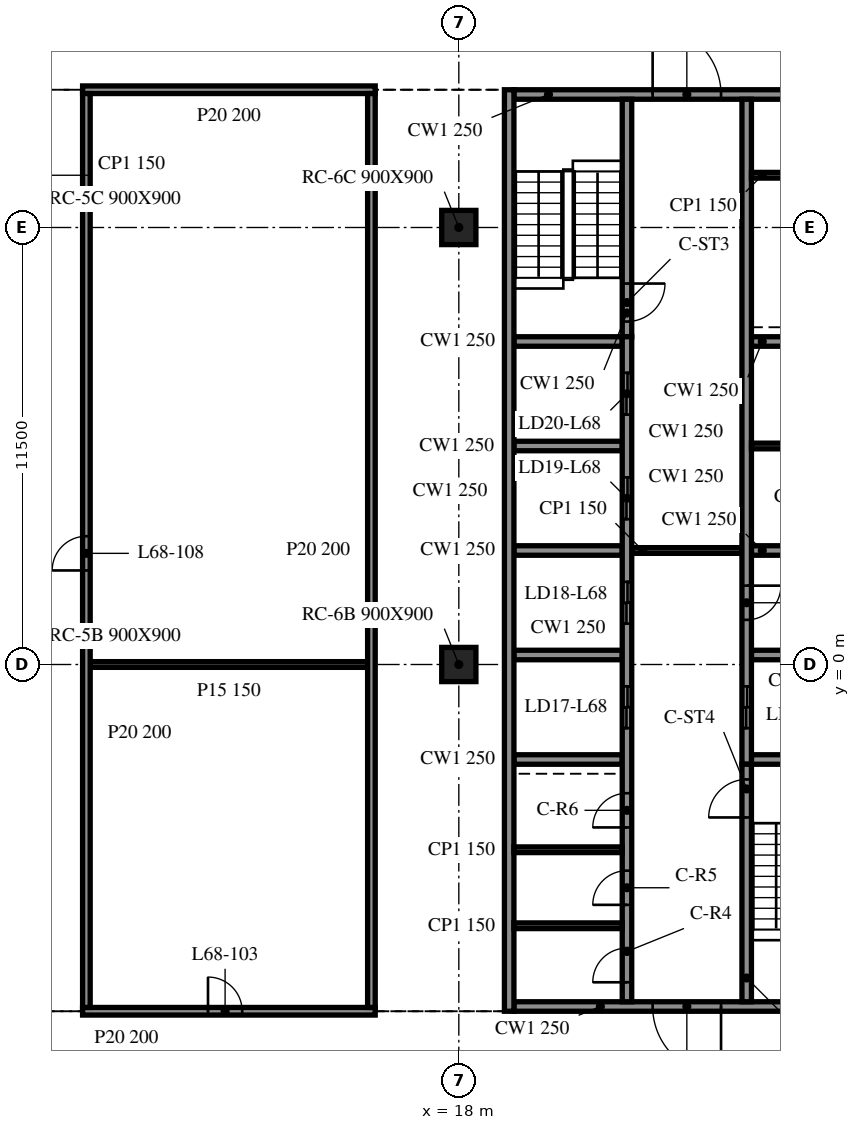
"""IFC4 building model, lengths in metres.
Left out: names, types, materials, properties, quantities, classifications, styles, units other than length and angle.
Written with IfcOpenShell. Run it as: python <this file> out.ifc"""

import sys

from ifc_helpers import new_model, si_unit, direction, frame, frame_2d, origin, origin_2d, place, context, subcontext, project, spatial, rectangle, extrude, element, fill, save


model = new_model("IFC4")
c1 = context("Model", 3, precision=1e-05, world=origin(), true_north=direction((0.0, 1.0)))
c2 = subcontext(c1, "Body", "Model", "MODEL_VIEW")
j1 = project(units=[si_unit("LENGTHUNIT", "METRE"), si_unit("PLANEANGLEUNIT", "RADIAN")], contexts=[c1])
p1 = place(None, origin())
s1 = spatial("IfcSite", under=j1, at=p1, CompositionType="ELEMENT")
p2 = place(p1, origin())
s2 = spatial("IfcBuilding", under=s1, at=p2, CompositionType="ELEMENT")
p3 = place(p2, frame((0.0, 0.0, 278.5)))
s3 = spatial("IfcBuildingStorey", under=s2, at=p3, CompositionType="ELEMENT", Elevation=278.5)
for number, where, z_axis, x_axis in (
    (1, (18.0, 0.0, -0.34), (0.0, 0.0, 1.0), (1.0, 0.0, 0.0)),
    (2, (18.0, 11.5, -0.34), (0.0, 0.0, 1.0), (1.0, 0.0, 0.0)),
):
    element("IfcColumn", number, at=place(p3, frame(where, z_axis=z_axis, x_axis=x_axis)), inside=s3, PredefinedType="COLUMN", context=c2, shape_type="SweptSolid", body=[
        extrude(rectangle(XDim=0.9, YDim=0.9, at=origin_2d()), origin(), (0.0, 0.0, 1.0), 3.8),
    ])
p4 = place(p3, frame((19.325, 15.125, 0.0), z_axis=(0.0, 0.0, 1.0), x_axis=(0.0, -1.0, 0.0)))
e3 = element("IfcWall", 3, at=p4, inside=s3, PredefinedType="SOLIDWALL", context=c2, shape_type="SweptSolid", body=[
    extrude(rectangle(XDim=24.25, YDim=0.25, at=frame_2d((12.125, 0.0))), origin(), (0.0, 0.0, 1.0), 3.46),
])
p5 = place(p3, frame((28.55, -9.0, 0.0), z_axis=(0.0, 0.0, 1.0), x_axis=(-1.0, 0.0, 0.0)))
e4 = element("IfcWall", 4, at=p5, inside=s3, PredefinedType="SOLIDWALL", context=c2, shape_type="SweptSolid", body=[
    extrude(rectangle(XDim=9.1, YDim=0.25, at=frame_2d((4.55, 0.0))), origin(), (0.0, 0.0, 1.0), 3.46),
])
p6 = place(p5, frame((3.65, 0.0, 0.0)))
e5 = element("IfcOpeningElement", 5, at=p6, cuts=e4, PredefinedType="OPENING", context=c2, shape_type="SweptSolid", body=[
    extrude(rectangle(XDim=1.8, YDim=2.1, at=frame_2d((0.9, 1.05))), frame((0.0, 0.135, 0.0), z_axis=(0.0, -1.0, 0.0), x_axis=(1.0, 0.0, 0.0)), (0.0, 0.0, 1.0), 0.27),
])
p7 = place(p3, frame((19.45, 15.0, 0.0), z_axis=(0.0, 0.0, 1.0), x_axis=(1.0, 0.0, 0.0)))
e6 = element("IfcWall", 6, at=p7, inside=s3, PredefinedType="SOLIDWALL", context=c2, shape_type="SweptSolid", body=[
    extrude(rectangle(XDim=9.1, YDim=0.25, at=frame_2d((4.55, 0.0))), origin(), (0.0, 0.0, 1.0), 3.46),
])
p8 = place(p7, frame((3.65, 0.0, 0.0)))
e7 = element("IfcOpeningElement", 7, at=p8, cuts=e6, PredefinedType="OPENING", context=c2, shape_type="SweptSolid", body=[
    extrude(rectangle(XDim=1.8, YDim=2.1, at=frame_2d((0.9, 1.05))), frame((0.0, 0.135, 0.0), z_axis=(0.0, -1.0, 0.0), x_axis=(1.0, 0.0, 0.0)), (0.0, 0.0, 1.0), 0.27),
])
p9 = place(p3, frame((22.425, -8.875, 0.0), z_axis=(0.0, 0.0, 1.0), x_axis=(0.0, 1.0, 0.0)))
e8 = element("IfcWall", 8, at=p9, inside=s3, PredefinedType="SOLIDWALL", context=c2, shape_type="SweptSolid", body=[
    extrude(rectangle(XDim=17.5, YDim=0.25, at=frame_2d((8.75, 0.0))), origin(), (0.0, 0.0, 1.0), 3.46),
])
p10 = place(p9, frame((7.2, 0.0, 0.0)))
e9 = element("IfcOpeningElement", 9, at=p10, cuts=e8, PredefinedType="OPENING", context=c2, shape_type="SweptSolid", body=[
    extrude(rectangle(XDim=1.1, YDim=2.1, at=frame_2d((0.55, 1.05))), frame((0.0, 0.135, 0.0), z_axis=(0.0, -1.0, 0.0), x_axis=(1.0, 0.0, 0.0)), (0.0, 0.0, 1.0), 0.27),
])
p11 = place(p9, frame((9.95, 0.0, 0.0)))
e10 = element("IfcOpeningElement", 10, at=p11, cuts=e8, PredefinedType="OPENING", context=c2, shape_type="SweptSolid", body=[
    extrude(rectangle(XDim=1.1, YDim=2.1, at=frame_2d((0.55, 1.05))), frame((0.0, 0.135, 0.0), z_axis=(0.0, -1.0, 0.0), x_axis=(1.0, 0.0, 0.0)), (0.0, 0.0, 1.0), 0.27),
])
p12 = place(p9, frame((12.7, 0.0, 0.0)))
e11 = element("IfcOpeningElement", 11, at=p12, cuts=e8, PredefinedType="OPENING", context=c2, shape_type="SweptSolid", body=[
    extrude(rectangle(XDim=1.1, YDim=2.1, at=frame_2d((0.55, 1.05))), frame((0.0, 0.135, 0.0), z_axis=(0.0, -1.0, 0.0), x_axis=(1.0, 0.0, 0.0)), (0.0, 0.0, 1.0), 0.27),
])
p13 = place(p9, frame((15.45, 0.0, 0.0)))
e12 = element("IfcOpeningElement", 12, at=p13, cuts=e8, PredefinedType="OPENING", context=c2, shape_type="SweptSolid", body=[
    extrude(rectangle(XDim=1.1, YDim=2.1, at=frame_2d((0.55, 1.05))), frame((0.0, 0.135, 0.0), z_axis=(0.0, -1.0, 0.0), x_axis=(1.0, 0.0, 0.0)), (0.0, 0.0, 1.0), 0.27),
])
p14 = place(p9, frame((0.512, 0.0, 0.0)))
e13 = element("IfcOpeningElement", 13, at=p14, cuts=e8, PredefinedType="OPENING", context=c2, shape_type="SweptSolid", body=[
    extrude(rectangle(XDim=0.9, YDim=2.1, at=frame_2d((0.45, 1.05))), frame((0.0, 0.135, 0.0), z_axis=(0.0, -1.0, 0.0), x_axis=(1.0, 0.0, 0.0)), (0.0, 0.0, 1.0), 0.27),
])
p15 = place(p9, frame((2.55, 0.0, 0.0)))
e14 = element("IfcOpeningElement", 14, at=p15, cuts=e8, PredefinedType="OPENING", context=c2, shape_type="SweptSolid", body=[
    extrude(rectangle(XDim=0.9, YDim=2.1, at=frame_2d((0.45, 1.05))), frame((0.0, 0.135, 0.0), z_axis=(0.0, -1.0, 0.0), x_axis=(1.0, 0.0, 0.0)), (0.0, 0.0, 1.0), 0.27),
])
p16 = place(p9, frame((4.587, 0.0, 0.0)))
e15 = element("IfcOpeningElement", 15, at=p16, cuts=e8, PredefinedType="OPENING", context=c2, shape_type="SweptSolid", body=[
    extrude(rectangle(XDim=0.9, YDim=2.1, at=frame_2d((0.45, 1.05))), frame((0.0, 0.135, 0.0), z_axis=(0.0, -1.0, 0.0), x_axis=(1.0, 0.0, 0.0)), (0.0, 0.0, 1.0), 0.27),
])
p17 = place(p3, frame((22.425, 14.875, 0.0), z_axis=(0.0, 0.0, 1.0), x_axis=(0.0, -1.0, 0.0)))
e16 = element("IfcWall", 16, at=p17, inside=s3, PredefinedType="SOLIDWALL", context=c2, shape_type="SweptSolid", body=[
    extrude(rectangle(XDim=6.25, YDim=0.25, at=frame_2d((3.125, 0.0))), origin(), (0.0, 0.0, 1.0), 3.46),
])
p18 = place(p17, frame((4.85, 0.0, 0.0)))
e17 = element("IfcOpeningElement", 17, at=p18, cuts=e16, PredefinedType="OPENING", context=c2, shape_type="SweptSolid", body=[
    extrude(rectangle(XDim=1.0, YDim=2.1, at=frame_2d((0.5, 1.05))), frame((0.0, 0.135, 0.0), z_axis=(0.0, -1.0, 0.0), x_axis=(1.0, 0.0, 0.0)), (0.0, 0.0, 1.0), 0.27),
])
p19 = place(p3, frame((25.575, -8.875, 0.0), z_axis=(0.0, 0.0, 1.0), x_axis=(0.0, 1.0, 0.0)))
e18 = element("IfcWall", 18, at=p19, inside=s3, PredefinedType="SOLIDWALL", context=c2, shape_type="SweptSolid", body=[
    extrude(rectangle(XDim=6.25, YDim=0.25, at=frame_2d((3.125, 0.0))), origin(), (0.0, 0.0, 1.0), 3.46),
])
p20 = place(p19, frame((4.85, 0.0, 0.0)))
e19 = element("IfcOpeningElement", 19, at=p20, cuts=e18, PredefinedType="OPENING", context=c2, shape_type="SweptSolid", body=[
    extrude(rectangle(XDim=1.0, YDim=2.1, at=frame_2d((0.5, 1.05))), frame((0.0, 0.135, 0.0), z_axis=(0.0, -1.0, 0.0), x_axis=(1.0, 0.0, 0.0)), (0.0, 0.0, 1.0), 0.27),
])
p21 = place(p3, frame((25.575, 14.875, 0.0), z_axis=(0.0, 0.0, 1.0), x_axis=(0.0, -1.0, 0.0)))
e20 = element("IfcWall", 20, at=p21, inside=s3, PredefinedType="SOLIDWALL", context=c2, shape_type="SweptSolid", body=[
    extrude(rectangle(XDim=17.5, YDim=0.25, at=frame_2d((8.75, 0.0))), origin(), (0.0, 0.0, 1.0), 3.46),
])
p22 = place(p21, frame((15.45, 0.0, 0.0)))
e21 = element("IfcOpeningElement", 21, at=p22, cuts=e20, PredefinedType="OPENING", context=c2, shape_type="SweptSolid", body=[
    extrude(rectangle(XDim=1.1, YDim=2.1, at=frame_2d((0.55, 1.05))), frame((0.0, 0.135, 0.0), z_axis=(0.0, -1.0, 0.0), x_axis=(1.0, 0.0, 0.0)), (0.0, 0.0, 1.0), 0.27),
])
p23 = place(p21, frame((12.8, 0.0, 0.0)))
e22 = element("IfcOpeningElement", 22, at=p23, cuts=e20, PredefinedType="OPENING", context=c2, shape_type="SweptSolid", body=[
    extrude(rectangle(XDim=0.9, YDim=2.1, at=frame_2d((0.45, 1.05))), frame((0.0, 0.135, 0.0), z_axis=(0.0, -1.0, 0.0), x_axis=(1.0, 0.0, 0.0)), (0.0, 0.0, 1.0), 0.27),
])
for number, where, z_axis, x_axis in (
    (23, (19.45, -2.5, 0.0), (0.0, 0.0, 1.0), (1.0, 0.0, 0.0)),
    (24, (19.45, 0.25, 0.0), (0.0, 0.0, 1.0), (1.0, 0.0, 0.0)),
    (25, (19.45, 3.0, 0.0), (0.0, 0.0, 1.0), (1.0, 0.0, 0.0)),
    (26, (19.45, 5.75, 0.0), (0.0, 0.0, 1.0), (1.0, 0.0, 0.0)),
    (27, (19.45, 8.5, 0.0), (0.0, 0.0, 1.0), (1.0, 0.0, 0.0)),
    (28, (25.7, -2.5, 0.0), (0.0, 0.0, 1.0), (1.0, 0.0, 0.0)),
    (29, (25.7, 0.25, 0.0), (0.0, 0.0, 1.0), (1.0, 0.0, 0.0)),
    (30, (25.7, 3.0, 0.0), (0.0, 0.0, 1.0), (1.0, 0.0, 0.0)),
    (31, (25.7, 8.5, 0.0), (0.0, 0.0, 1.0), (1.0, 0.0, 0.0)),
):
    element("IfcWall", number, at=place(p3, frame(where, z_axis=z_axis, x_axis=x_axis)), inside=s3, PredefinedType="SOLIDWALL", context=c2, shape_type="SweptSolid", body=[
        extrude(rectangle(XDim=2.85, YDim=0.25, at=frame_2d((1.425, 0.0))), origin(), (0.0, 0.0, 1.0), 3.46),
    ])
p24 = place(p3, frame((22.55, 3.0, 0.0), z_axis=(0.0, 0.0, 1.0), x_axis=(1.0, 0.0, 0.0)))
e32 = element("IfcWall", 32, at=p24, inside=s3, PredefinedType="PARTITIONING", context=c2, shape_type="SweptSolid", body=[
    extrude(rectangle(XDim=2.9, YDim=0.15, at=frame_2d((1.45, 0.0))), origin(), (0.0, 0.0, 1.0), 3.46),
])
for number, where, z_axis, x_axis in (
    (33, (25.7, 5.75, 0.0), (0.0, 0.0, 1.0), (1.0, 0.0, 0.0)),
    (34, (19.45, -6.875, 0.0), (0.0, 0.0, 1.0), (1.0, 0.0, 0.0)),
    (35, (19.45, -4.875, 0.0), (0.0, 0.0, 1.0), (1.0, 0.0, 0.0)),
    (36, (25.7, 12.875, 0.0), (0.0, 0.0, 1.0), (1.0, 0.0, 0.0)),
):
    element("IfcWall", number, at=place(p3, frame(where, z_axis=z_axis, x_axis=x_axis)), inside=s3, PredefinedType="PARTITIONING", context=c2, shape_type="SweptSolid", body=[
        extrude(rectangle(XDim=2.85, YDim=0.15, at=frame_2d((1.425, 0.0))), origin(), (0.0, 0.0, 1.0), 3.46),
    ])
p25 = place(p3, frame((8.1, -9.125, 0.0), z_axis=(0.0, 0.0, 1.0), x_axis=(1.0, 0.0, 0.0)))
e37 = element("IfcWall", 37, at=p25, inside=s3, PredefinedType="PARTITIONING", context=c2, shape_type="SweptSolid", body=[
    extrude(rectangle(XDim=7.7, YDim=0.2, at=frame_2d((3.85, 0.0))), origin(), (0.0, 0.0, 1.0), 3.46),
])
p26 = place(p25, frame((3.3, 0.0, 0.0)))
e38 = element("IfcOpeningElement", 38, at=p26, cuts=e37, PredefinedType="OPENING", context=c2, shape_type="SweptSolid", body=[
    extrude(rectangle(XDim=0.9, YDim=2.1, at=frame_2d((0.45, 1.05))), frame((0.0, 0.11, 0.0), z_axis=(0.0, -1.0, 0.0), x_axis=(1.0, 0.0, 0.0)), (0.0, 0.0, 1.0), 0.22),
])
p27 = place(p3, frame((8.3, 0.0, 0.0), z_axis=(0.0, 0.0, 1.0), x_axis=(1.0, 0.0, 0.0)))
e39 = element("IfcWall", 39, at=p27, inside=s3, PredefinedType="PARTITIONING", context=c2, shape_type="SweptSolid", body=[
    extrude(rectangle(XDim=7.3, YDim=0.15, at=frame_2d((3.65, 0.0))), origin(), (0.0, 0.0, 1.0), 3.46),
])
p28 = place(p3, frame((8.1, 15.125, 0.0), z_axis=(0.0, 0.0, 1.0), x_axis=(1.0, 0.0, 0.0)))
e40 = element("IfcWall", 40, at=p28, inside=s3, PredefinedType="PARTITIONING", context=c2, shape_type="SweptSolid", body=[
    extrude(rectangle(XDim=7.7, YDim=0.2, at=frame_2d((3.85, 0.0))), origin(), (0.0, 0.0, 1.0), 3.46),
])
p29 = place(p3, frame((8.2, -9.025, 0.0), z_axis=(0.0, 0.0, 1.0), x_axis=(0.0, 1.0, 0.0)))
e41 = element("IfcWall", 41, at=p29, inside=s3, PredefinedType="PARTITIONING", context=c2, shape_type="SweptSolid", body=[
    extrude(rectangle(XDim=24.05, YDim=0.2, at=frame_2d((12.025, 0.0))), origin(), (0.0, 0.0, 1.0), 3.46),
])
p30 = place(p29, frame((11.5, 0.0, 0.0)))
e42 = element("IfcOpeningElement", 42, at=p30, cuts=e41, PredefinedType="OPENING", context=c2, shape_type="SweptSolid", body=[
    extrude(rectangle(XDim=0.9, YDim=2.1, at=frame_2d((0.45, 1.05))), frame((0.0, 0.11, 0.0), z_axis=(0.0, -1.0, 0.0), x_axis=(1.0, 0.0, 0.0)), (0.0, 0.0, 1.0), 0.22),
])
p31 = place(p3, frame((15.7, -9.025, 0.0), z_axis=(0.0, 0.0, 1.0), x_axis=(0.0, 1.0, 0.0)))
e43 = element("IfcWall", 43, at=p31, inside=s3, PredefinedType="PARTITIONING", context=c2, shape_type="SweptSolid", body=[
    extrude(rectangle(XDim=24.05, YDim=0.2, at=frame_2d((12.025, 0.0))), origin(), (0.0, 0.0, 1.0), 3.46),
])
p32 = place(p6, origin())
e44 = element("IfcDoor", 44, at=p32, inside=s3, OperationType="DOUBLE_DOOR_SINGLE_SWING", PredefinedType="DOOR", context=c2, shape_type="SweptSolid", body=[
    extrude(rectangle(XDim=1.8, YDim=2.1, at=frame_2d((0.9, 1.05))), frame((0.0, 0.025, 0.0), z_axis=(0.0, -1.0, 0.0), x_axis=(1.0, 0.0, 0.0)), (0.0, 0.0, 1.0), 0.05),
])
fill(e5, e44)
p33 = place(p8, origin())
e45 = element("IfcDoor", 45, at=p33, inside=s3, OperationType="DOUBLE_DOOR_SINGLE_SWING", PredefinedType="DOOR", context=c2, shape_type="SweptSolid", body=[
    extrude(rectangle(XDim=1.8, YDim=2.1, at=frame_2d((0.9, 1.05))), frame((0.0, 0.025, 0.0), z_axis=(0.0, -1.0, 0.0), x_axis=(1.0, 0.0, 0.0)), (0.0, 0.0, 1.0), 0.05),
])
fill(e7, e45)
p34 = place(p22, origin())
e46 = element("IfcDoor", 46, at=p34, inside=s3, OperationType="DOUBLE_DOOR_SLIDING", PredefinedType="DOOR", context=c2, shape_type="SweptSolid", body=[
    extrude(rectangle(XDim=1.1, YDim=2.1, at=frame_2d((0.55, 1.05))), frame((0.0, 0.025, 0.0), z_axis=(0.0, -1.0, 0.0), x_axis=(1.0, 0.0, 0.0)), (0.0, 0.0, 1.0), 0.05),
])
fill(e21, e46)
p35 = place(p10, origin())
e47 = element("IfcDoor", 47, at=p35, inside=s3, OperationType="DOUBLE_DOOR_SLIDING", PredefinedType="DOOR", context=c2, shape_type="SweptSolid", body=[
    extrude(rectangle(XDim=1.1, YDim=2.1, at=frame_2d((0.55, 1.05))), frame((0.0, 0.025, 0.0), z_axis=(0.0, -1.0, 0.0), x_axis=(1.0, 0.0, 0.0)), (0.0, 0.0, 1.0), 0.05),
])
fill(e9, e47)
p36 = place(p11, origin())
e48 = element("IfcDoor", 48, at=p36, inside=s3, OperationType="DOUBLE_DOOR_SLIDING", PredefinedType="DOOR", context=c2, shape_type="SweptSolid", body=[
    extrude(rectangle(XDim=1.1, YDim=2.1, at=frame_2d((0.55, 1.05))), frame((0.0, 0.025, 0.0), z_axis=(0.0, -1.0, 0.0), x_axis=(1.0, 0.0, 0.0)), (0.0, 0.0, 1.0), 0.05),
])
fill(e10, e48)
p37 = place(p12, origin())
e49 = element("IfcDoor", 49, at=p37, inside=s3, OperationType="DOUBLE_DOOR_SLIDING", PredefinedType="DOOR", context=c2, shape_type="SweptSolid", body=[
    extrude(rectangle(XDim=1.1, YDim=2.1, at=frame_2d((0.55, 1.05))), frame((0.0, 0.025, 0.0), z_axis=(0.0, -1.0, 0.0), x_axis=(1.0, 0.0, 0.0)), (0.0, 0.0, 1.0), 0.05),
])
fill(e11, e49)
p38 = place(p13, origin())
e50 = element("IfcDoor", 50, at=p38, inside=s3, OperationType="DOUBLE_DOOR_SLIDING", PredefinedType="DOOR", context=c2, shape_type="SweptSolid", body=[
    extrude(rectangle(XDim=1.1, YDim=2.1, at=frame_2d((0.55, 1.05))), frame((0.0, 0.025, 0.0), z_axis=(0.0, -1.0, 0.0), x_axis=(1.0, 0.0, 0.0)), (0.0, 0.0, 1.0), 0.05),
])
fill(e12, e50)
p39 = place(p23, origin())
e51 = element("IfcDoor", 51, at=p39, inside=s3, OperationType="SINGLE_SWING_LEFT", PredefinedType="DOOR", context=c2, shape_type="SweptSolid", body=[
    extrude(rectangle(XDim=0.9, YDim=2.1, at=frame_2d((0.45, 1.05))), frame((0.0, 0.025, 0.0), z_axis=(0.0, -1.0, 0.0), x_axis=(1.0, 0.0, 0.0)), (0.0, 0.0, 1.0), 0.05),
])
fill(e22, e51)
p40 = place(p14, origin())
e52 = element("IfcDoor", 52, at=p40, inside=s3, OperationType="SINGLE_SWING_RIGHT", PredefinedType="DOOR", context=c2, shape_type="SweptSolid", body=[
    extrude(rectangle(XDim=0.9, YDim=2.1, at=frame_2d((0.45, 1.05))), frame((0.0, 0.025, 0.0), z_axis=(0.0, -1.0, 0.0), x_axis=(1.0, 0.0, 0.0)), (0.0, 0.0, 1.0), 0.05),
])
fill(e13, e52)
p41 = place(p15, origin())
e53 = element("IfcDoor", 53, at=p41, inside=s3, OperationType="SINGLE_SWING_LEFT", PredefinedType="DOOR", context=c2, shape_type="SweptSolid", body=[
    extrude(rectangle(XDim=0.9, YDim=2.1, at=frame_2d((0.45, 1.05))), frame((0.0, 0.025, 0.0), z_axis=(0.0, -1.0, 0.0), x_axis=(1.0, 0.0, 0.0)), (0.0, 0.0, 1.0), 0.05),
])
fill(e14, e53)
p42 = place(p16, origin())
e54 = element("IfcDoor", 54, at=p42, inside=s3, OperationType="SINGLE_SWING_RIGHT", PredefinedType="DOOR", context=c2, shape_type="SweptSolid", body=[
    extrude(rectangle(XDim=0.9, YDim=2.1, at=frame_2d((0.45, 1.05))), frame((0.0, 0.025, 0.0), z_axis=(0.0, -1.0, 0.0), x_axis=(1.0, 0.0, 0.0)), (0.0, 0.0, 1.0), 0.05),
])
fill(e15, e54)
p43 = place(p18, origin())
e55 = element("IfcDoor", 55, at=p43, inside=s3, OperationType="SINGLE_SWING_LEFT", PredefinedType="DOOR", context=c2, shape_type="SweptSolid", body=[
    extrude(rectangle(XDim=1.0, YDim=2.1, at=frame_2d((0.5, 1.05))), frame((0.0, 0.025, 0.0), z_axis=(0.0, -1.0, 0.0), x_axis=(1.0, 0.0, 0.0)), (0.0, 0.0, 1.0), 0.05),
])
fill(e17, e55)
p44 = place(p20, origin())
e56 = element("IfcDoor", 56, at=p44, inside=s3, OperationType="SINGLE_SWING_RIGHT", PredefinedType="DOOR", context=c2, shape_type="SweptSolid", body=[
    extrude(rectangle(XDim=1.0, YDim=2.1, at=frame_2d((0.5, 1.05))), frame((0.0, 0.025, 0.0), z_axis=(0.0, -1.0, 0.0), x_axis=(1.0, 0.0, 0.0)), (0.0, 0.0, 1.0), 0.05),
])
fill(e19, e56)
p45 = place(p26, origin())
e57 = element("IfcDoor", 57, at=p45, inside=s3, OperationType="SINGLE_SWING_LEFT", PredefinedType="DOOR", context=c2, shape_type="SweptSolid", body=[
    extrude(rectangle(XDim=0.9, YDim=2.1, at=frame_2d((0.45, 1.05))), frame((0.0, 0.025, 0.0), z_axis=(0.0, -1.0, 0.0), x_axis=(1.0, 0.0, 0.0)), (0.0, 0.0, 1.0), 0.05),
])
fill(e38, e57)
p46 = place(p30, origin())
e58 = element("IfcDoor", 58, at=p46, inside=s3, OperationType="SINGLE_SWING_RIGHT", PredefinedType="DOOR", context=c2, shape_type="SweptSolid", body=[
    extrude(rectangle(XDim=0.9, YDim=2.1, at=frame_2d((0.45, 1.05))), frame((0.0, 0.025, 0.0), z_axis=(0.0, -1.0, 0.0), x_axis=(1.0, 0.0, 0.0)), (0.0, 0.0, 1.0), 0.05),
])
fill(e42, e58)
save(model, sys.argv[1])
